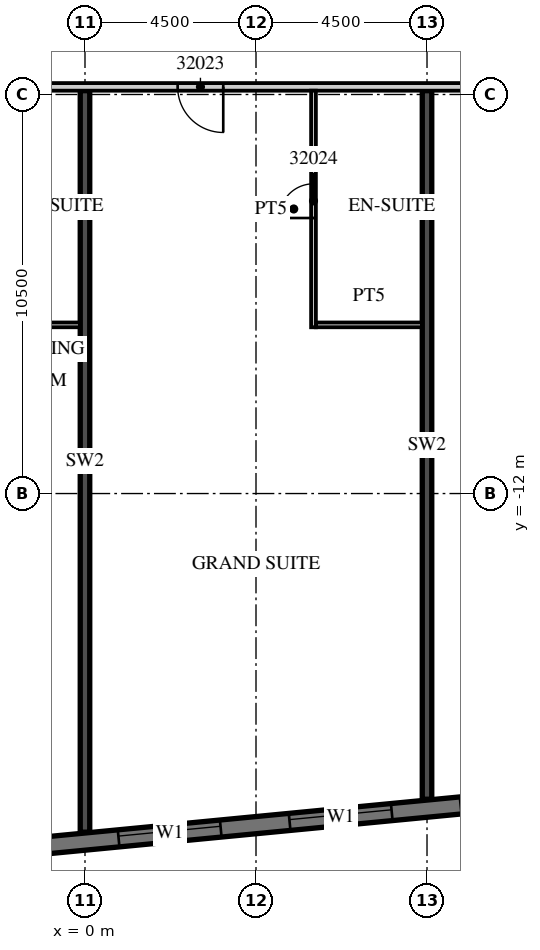
"""IFC4 building model, lengths in metres.
Left out: names, types, materials, properties, quantities, classifications, styles, units other than length and angle.
Written with IfcOpenShell. Run it as: python <this file> out.ifc"""

import sys

from ifc_helpers import new_model, si_unit, direction, frame, frame_2d, origin, place, context, subcontext, project, spatial, rectangle, extrude, element, fill, save


model = new_model("IFC4")
c1 = context("Model", 3, precision=1e-05, world=origin(), true_north=direction((0.0, 1.0)))
c2 = subcontext(c1, "Body", "Model", "MODEL_VIEW")
j1 = project(units=[si_unit("LENGTHUNIT", "METRE"), si_unit("PLANEANGLEUNIT", "RADIAN")], contexts=[c1])
p1 = place(None, origin())
s1 = spatial("IfcSite", under=j1, at=p1, CompositionType="ELEMENT")
p2 = place(p1, origin())
s2 = spatial("IfcBuilding", under=s1, at=p2, CompositionType="ELEMENT")
p3 = place(p2, frame((0.0, 0.0, 140.5)))
s3 = spatial("IfcBuildingStorey", under=s2, at=p3, CompositionType="ELEMENT", Elevation=140.5)
p4 = place(p3, frame((0.0, -20.91, 0.0), z_axis=(0.0, 0.0, 1.0), x_axis=(0.0, 1.0, 0.0)))
e1 = element("IfcWall", 1, at=p4, inside=s3, PredefinedType="SHEAR", context=c2, shape_type="SweptSolid", body=[
    extrude(rectangle(XDim=19.51, YDim=0.25, at=frame_2d((9.755, 0.0))), origin(), (0.0, 0.0, 1.0), 3.3),
])
p5 = place(p3, frame((9.0, -20.044, 0.0), z_axis=(0.0, 0.0, 1.0), x_axis=(0.0, 1.0, 0.0)))
e2 = element("IfcWall", 2, at=p5, inside=s3, PredefinedType="SHEAR", context=c2, shape_type="SweptSolid", body=[
    extrude(rectangle(XDim=18.644, YDim=0.25, at=frame_2d((9.322, 0.0))), origin(), (0.0, 0.0, 1.0), 3.3),
])
p6 = place(p3, frame((-13.521, -22.46, 0.0), z_axis=(0.0, 0.0, 1.0), x_axis=(0.995396096335, 0.095846812164, 0.0)))
e3 = element("IfcWall", 3, at=p6, inside=s3, PredefinedType="SOLIDWALL", context=c2, shape_type="SweptSolid", body=[
    extrude(rectangle(XDim=59.151, YDim=0.45, at=frame_2d((29.575, 0.0))), origin(), (0.0, 0.0, 1.0), 3.02),
])
p7 = place(p6, frame((0.91, 0.0, 0.45)))
e4 = element("IfcOpeningElement", 4, at=p7, cuts=e3, PredefinedType="OPENING", context=c2, shape_type="SweptSolid", body=[
    extrude(rectangle(XDim=2.7, YDim=2.25, at=frame_2d((1.35, 1.125))), frame((0.0, 0.235, 0.0), z_axis=(0.0, -1.0, 0.0), x_axis=(1.0, 0.0, 0.0)), (0.0, 0.0, 1.0), 0.47),
])
p8 = place(p6, frame((5.431, 0.0, 0.45)))
e5 = element("IfcOpeningElement", 5, at=p8, cuts=e3, PredefinedType="OPENING", context=c2, shape_type="SweptSolid", body=[
    extrude(rectangle(XDim=2.7, YDim=2.25, at=frame_2d((1.35, 1.125))), frame((0.0, 0.235, 0.0), z_axis=(0.0, -1.0, 0.0), x_axis=(1.0, 0.0, 0.0)), (0.0, 0.0, 1.0), 0.47),
])
p9 = place(p6, frame((9.952, 0.0, 0.45)))
e6 = element("IfcOpeningElement", 6, at=p9, cuts=e3, PredefinedType="OPENING", context=c2, shape_type="SweptSolid", body=[
    extrude(rectangle(XDim=2.7, YDim=2.25, at=frame_2d((1.35, 1.125))), frame((0.0, 0.235, 0.0), z_axis=(0.0, -1.0, 0.0), x_axis=(1.0, 0.0, 0.0)), (0.0, 0.0, 1.0), 0.47),
])
p10 = place(p6, frame((14.473, 0.0, 0.45)))
e7 = element("IfcOpeningElement", 7, at=p10, cuts=e3, PredefinedType="OPENING", context=c2, shape_type="SweptSolid", body=[
    extrude(rectangle(XDim=2.7, YDim=2.25, at=frame_2d((1.35, 1.125))), frame((0.0, 0.235, 0.0), z_axis=(0.0, -1.0, 0.0), x_axis=(1.0, 0.0, 0.0)), (0.0, 0.0, 1.0), 0.47),
])
p11 = place(p6, frame((18.994, 0.0, 0.45)))
e8 = element("IfcOpeningElement", 8, at=p11, cuts=e3, PredefinedType="OPENING", context=c2, shape_type="SweptSolid", body=[
    extrude(rectangle(XDim=2.7, YDim=2.25, at=frame_2d((1.35, 1.125))), frame((0.0, 0.235, 0.0), z_axis=(0.0, -1.0, 0.0), x_axis=(1.0, 0.0, 0.0)), (0.0, 0.0, 1.0), 0.47),
])
p12 = place(p6, frame((23.514, 0.0, 0.45)))
e9 = element("IfcOpeningElement", 9, at=p12, cuts=e3, PredefinedType="OPENING", context=c2, shape_type="SweptSolid", body=[
    extrude(rectangle(XDim=2.7, YDim=2.25, at=frame_2d((1.35, 1.125))), frame((0.0, 0.235, 0.0), z_axis=(0.0, -1.0, 0.0), x_axis=(1.0, 0.0, 0.0)), (0.0, 0.0, 1.0), 0.47),
])
p13 = place(p6, frame((28.035, 0.0, 0.45)))
e10 = element("IfcOpeningElement", 10, at=p13, cuts=e3, PredefinedType="OPENING", context=c2, shape_type="SweptSolid", body=[
    extrude(rectangle(XDim=2.7, YDim=2.25, at=frame_2d((1.35, 1.125))), frame((0.0, 0.235, 0.0), z_axis=(0.0, -1.0, 0.0), x_axis=(1.0, 0.0, 0.0)), (0.0, 0.0, 1.0), 0.47),
])
p14 = place(p6, frame((32.556, 0.0, 0.45)))
e11 = element("IfcOpeningElement", 11, at=p14, cuts=e3, PredefinedType="OPENING", context=c2, shape_type="SweptSolid", body=[
    extrude(rectangle(XDim=2.7, YDim=2.25, at=frame_2d((1.35, 1.125))), frame((0.0, 0.235, 0.0), z_axis=(0.0, -1.0, 0.0), x_axis=(1.0, 0.0, 0.0)), (0.0, 0.0, 1.0), 0.47),
])
p15 = place(p6, frame((37.077, 0.0, 0.45)))
e12 = element("IfcOpeningElement", 12, at=p15, cuts=e3, PredefinedType="OPENING", context=c2, shape_type="SweptSolid", body=[
    extrude(rectangle(XDim=2.7, YDim=2.25, at=frame_2d((1.35, 1.125))), frame((0.0, 0.235, 0.0), z_axis=(0.0, -1.0, 0.0), x_axis=(1.0, 0.0, 0.0)), (0.0, 0.0, 1.0), 0.47),
])
p16 = place(p6, frame((41.598, 0.0, 0.45)))
e13 = element("IfcOpeningElement", 13, at=p16, cuts=e3, PredefinedType="OPENING", context=c2, shape_type="SweptSolid", body=[
    extrude(rectangle(XDim=2.7, YDim=2.25, at=frame_2d((1.35, 1.125))), frame((0.0, 0.235, 0.0), z_axis=(0.0, -1.0, 0.0), x_axis=(1.0, 0.0, 0.0)), (0.0, 0.0, 1.0), 0.47),
])
p17 = place(p6, frame((46.118, 0.0, 0.45)))
e14 = element("IfcOpeningElement", 14, at=p17, cuts=e3, PredefinedType="OPENING", context=c2, shape_type="SweptSolid", body=[
    extrude(rectangle(XDim=2.7, YDim=2.25, at=frame_2d((1.35, 1.125))), frame((0.0, 0.235, 0.0), z_axis=(0.0, -1.0, 0.0), x_axis=(1.0, 0.0, 0.0)), (0.0, 0.0, 1.0), 0.47),
])
p18 = place(p6, frame((50.639, 0.0, 0.45)))
e15 = element("IfcOpeningElement", 15, at=p18, cuts=e3, PredefinedType="OPENING", context=c2, shape_type="SweptSolid", body=[
    extrude(rectangle(XDim=2.7, YDim=2.25, at=frame_2d((1.35, 1.125))), frame((0.0, 0.235, 0.0), z_axis=(0.0, -1.0, 0.0), x_axis=(1.0, 0.0, 0.0)), (0.0, 0.0, 1.0), 0.47),
])
p19 = place(p6, frame((55.15, 0.0, 0.45)))
e16 = element("IfcOpeningElement", 16, at=p19, cuts=e3, PredefinedType="OPENING", context=c2, shape_type="SweptSolid", body=[
    extrude(rectangle(XDim=2.7, YDim=2.25, at=frame_2d((1.35, 1.125))), frame((0.0, 0.235, 0.0), z_axis=(0.0, -1.0, 0.0), x_axis=(1.0, 0.0, 0.0)), (0.0, 0.0, 1.0), 0.47),
])
p20 = place(p3, frame((-13.5, -1.3, 0.0), z_axis=(0.0, 0.0, 1.0), x_axis=(1.0, 0.0, 0.0)))
e17 = element("IfcWall", 17, at=p20, inside=s3, PredefinedType="PARTITIONING", context=c2, shape_type="SweptSolid", body=[
    extrude(rectangle(XDim=60.932, YDim=0.2, at=frame_2d((30.466, 0.0))), origin(), (0.0, 0.0, 1.0), 3.02),
])
p21 = place(p20, frame((2.925, 0.0, 0.0)))
e18 = element("IfcOpeningElement", 18, at=p21, cuts=e17, PredefinedType="OPENING", context=c2, shape_type="SweptSolid", body=[
    extrude(rectangle(XDim=1.0, YDim=2.1, at=frame_2d((0.5, 1.05))), frame((0.0, 0.11, 0.0), z_axis=(0.0, -1.0, 0.0), x_axis=(1.0, 0.0, 0.0)), (0.0, 0.0, 1.0), 0.22),
])
p22 = place(p20, frame((7.45, 0.0, 0.0)))
e19 = element("IfcOpeningElement", 19, at=p22, cuts=e17, PredefinedType="OPENING", context=c2, shape_type="SweptSolid", body=[
    extrude(rectangle(XDim=1.0, YDim=2.1, at=frame_2d((0.5, 1.05))), frame((0.0, 0.11, 0.0), z_axis=(0.0, -1.0, 0.0), x_axis=(1.0, 0.0, 0.0)), (0.0, 0.0, 1.0), 0.22),
])
p23 = place(p20, frame((9.55, 0.0, 0.0)))
e20 = element("IfcOpeningElement", 20, at=p23, cuts=e17, PredefinedType="OPENING", context=c2, shape_type="SweptSolid", body=[
    extrude(rectangle(XDim=1.0, YDim=2.1, at=frame_2d((0.5, 1.05))), frame((0.0, 0.11, 0.0), z_axis=(0.0, -1.0, 0.0), x_axis=(1.0, 0.0, 0.0)), (0.0, 0.0, 1.0), 0.22),
])
p24 = place(p20, frame((15.938, 0.0, 0.0)))
e21 = element("IfcOpeningElement", 21, at=p24, cuts=e17, PredefinedType="OPENING", context=c2, shape_type="SweptSolid", body=[
    extrude(rectangle(XDim=1.2, YDim=2.1, at=frame_2d((0.6, 1.05))), frame((0.0, 0.11, 0.0), z_axis=(0.0, -1.0, 0.0), x_axis=(1.0, 0.0, 0.0)), (0.0, 0.0, 1.0), 0.22),
])
p25 = place(p20, frame((24.938, 0.0, 0.0)))
e22 = element("IfcOpeningElement", 22, at=p25, cuts=e17, PredefinedType="OPENING", context=c2, shape_type="SweptSolid", body=[
    extrude(rectangle(XDim=1.2, YDim=2.1, at=frame_2d((0.6, 1.05))), frame((0.0, 0.11, 0.0), z_axis=(0.0, -1.0, 0.0), x_axis=(1.0, 0.0, 0.0)), (0.0, 0.0, 1.0), 0.22),
])
p26 = place(p20, frame((32.075, 0.0, 0.0)))
e23 = element("IfcOpeningElement", 23, at=p26, cuts=e17, PredefinedType="OPENING", context=c2, shape_type="SweptSolid", body=[
    extrude(rectangle(XDim=1.0, YDim=2.1, at=frame_2d((0.5, 1.05))), frame((0.0, 0.11, 0.0), z_axis=(0.0, -1.0, 0.0), x_axis=(1.0, 0.0, 0.0)), (0.0, 0.0, 1.0), 0.22),
])
p27 = place(p20, frame((36.55, 0.0, 0.0)))
e24 = element("IfcOpeningElement", 24, at=p27, cuts=e17, PredefinedType="OPENING", context=c2, shape_type="SweptSolid", body=[
    extrude(rectangle(XDim=1.0, YDim=2.1, at=frame_2d((0.5, 1.05))), frame((0.0, 0.11, 0.0), z_axis=(0.0, -1.0, 0.0), x_axis=(1.0, 0.0, 0.0)), (0.0, 0.0, 1.0), 0.22),
])
p28 = place(p20, frame((45.862, 0.0, 0.0)))
e25 = element("IfcOpeningElement", 25, at=p28, cuts=e17, PredefinedType="OPENING", context=c2, shape_type="SweptSolid", body=[
    extrude(rectangle(XDim=1.2, YDim=2.1, at=frame_2d((0.6, 1.05))), frame((0.0, 0.11, 0.0), z_axis=(0.0, -1.0, 0.0), x_axis=(1.0, 0.0, 0.0)), (0.0, 0.0, 1.0), 0.22),
])
p29 = place(p20, frame((50.075, 0.0, 0.0)))
e26 = element("IfcOpeningElement", 26, at=p29, cuts=e17, PredefinedType="OPENING", context=c2, shape_type="SweptSolid", body=[
    extrude(rectangle(XDim=1.0, YDim=2.1, at=frame_2d((0.5, 1.05))), frame((0.0, 0.11, 0.0), z_axis=(0.0, -1.0, 0.0), x_axis=(1.0, 0.0, 0.0)), (0.0, 0.0, 1.0), 0.22),
])
p30 = place(p20, frame((56.95, 0.0, 0.0)))
e27 = element("IfcOpeningElement", 27, at=p30, cuts=e17, PredefinedType="OPENING", context=c2, shape_type="SweptSolid", body=[
    extrude(rectangle(XDim=1.0, YDim=2.1, at=frame_2d((0.5, 1.05))), frame((0.0, 0.11, 0.0), z_axis=(0.0, -1.0, 0.0), x_axis=(1.0, 0.0, 0.0)), (0.0, 0.0, 1.0), 0.22),
])
p31 = place(p20, frame((59.882, 0.0, 0.0)))
e28 = element("IfcOpeningElement", 28, at=p31, cuts=e17, PredefinedType="OPENING", context=c2, shape_type="SweptSolid", body=[
    extrude(rectangle(XDim=0.9, YDim=2.1, at=frame_2d((0.45, 1.05))), frame((0.0, 0.11, 0.0), z_axis=(0.0, -1.0, 0.0), x_axis=(1.0, 0.0, 0.0)), (0.0, 0.0, 1.0), 0.22),
])
p32 = place(p3, frame((-2.375, -7.562, 0.0), z_axis=(0.0, 0.0, 1.0), x_axis=(1.0, 0.0, 0.0)))
e29 = element("IfcWall", 29, at=p32, inside=s3, PredefinedType="PARTITIONING", context=c2, shape_type="SweptSolid", body=[
    extrude(rectangle(XDim=2.25, YDim=0.125, at=frame_2d((1.125, 0.0))), origin(), (0.0, 0.0, 1.0), 3.02),
])
p33 = place(p3, frame((6.013, -7.625, 0.0), z_axis=(0.0, 0.0, 1.0), x_axis=(0.0, 1.0, 0.0)))
e30 = element("IfcWall", 30, at=p33, inside=s3, PredefinedType="PARTITIONING", context=c2, shape_type="SweptSolid", body=[
    extrude(rectangle(XDim=6.225, YDim=0.125, at=frame_2d((3.113, 0.0))), origin(), (0.0, 0.0, 1.0), 3.02),
])
p34 = place(p33, frame((2.875, 0.0, 0.0)))
e31 = element("IfcOpeningElement", 31, at=p34, cuts=e30, PredefinedType="OPENING", context=c2, shape_type="SweptSolid", body=[
    extrude(rectangle(XDim=0.9, YDim=2.1, at=frame_2d((0.45, 1.05))), frame((0.0, 0.073, 0.0), z_axis=(0.0, -1.0, 0.0), x_axis=(1.0, 0.0, 0.0)), (0.0, 0.0, 1.0), 0.145),
])
p35 = place(p3, frame((6.075, -7.562, 0.0), z_axis=(0.0, 0.0, 1.0), x_axis=(1.0, 0.0, 0.0)))
e32 = element("IfcWall", 32, at=p35, inside=s3, PredefinedType="PARTITIONING", context=c2, shape_type="SweptSolid", body=[
    extrude(rectangle(XDim=2.8, YDim=0.125, at=frame_2d((1.4, 0.0))), origin(), (0.0, 0.0, 1.0), 3.02),
])
p36 = place(p10, origin())
e33 = element("IfcWindow", 33, at=p36, inside=s3, PartitioningType="SINGLE_PANEL", PredefinedType="WINDOW", context=c2, shape_type="SweptSolid", body=[
    extrude(rectangle(XDim=2.7, YDim=2.25, at=frame_2d((1.35, 1.125))), frame((0.0, 0.09, 0.0), z_axis=(0.0, -1.0, 0.0), x_axis=(1.0, 0.0, 0.0)), (0.0, 0.0, 1.0), 0.06),
])
fill(e7, e33)
p37 = place(p11, origin())
e34 = element("IfcWindow", 34, at=p37, inside=s3, PartitioningType="SINGLE_PANEL", PredefinedType="WINDOW", context=c2, shape_type="SweptSolid", body=[
    extrude(rectangle(XDim=2.7, YDim=2.25, at=frame_2d((1.35, 1.125))), frame((0.0, 0.09, 0.0), z_axis=(0.0, -1.0, 0.0), x_axis=(1.0, 0.0, 0.0)), (0.0, 0.0, 1.0), 0.06),
])
fill(e8, e34)
p38 = place(p24, origin())
e35 = element("IfcDoor", 35, at=p38, inside=s3, OperationType="SINGLE_SWING_RIGHT", PredefinedType="DOOR", context=c2, shape_type="SweptSolid", body=[
    extrude(rectangle(XDim=1.2, YDim=2.1, at=frame_2d((0.6, 1.05))), frame((0.0, 0.025, 0.0), z_axis=(0.0, -1.0, 0.0), x_axis=(1.0, 0.0, 0.0)), (0.0, 0.0, 1.0), 0.05),
])
fill(e21, e35)
p39 = place(p34, origin())
e36 = element("IfcDoor", 36, at=p39, inside=s3, OperationType="SINGLE_SWING_LEFT", PredefinedType="DOOR", context=c2, shape_type="SweptSolid", body=[
    extrude(rectangle(XDim=0.9, YDim=2.1, at=frame_2d((0.45, 1.05))), frame((0.0, 0.025, 0.0), z_axis=(0.0, -1.0, 0.0), x_axis=(1.0, 0.0, 0.0)), (0.0, 0.0, 1.0), 0.05),
])
fill(e31, e36)
save(model, sys.argv[1])
